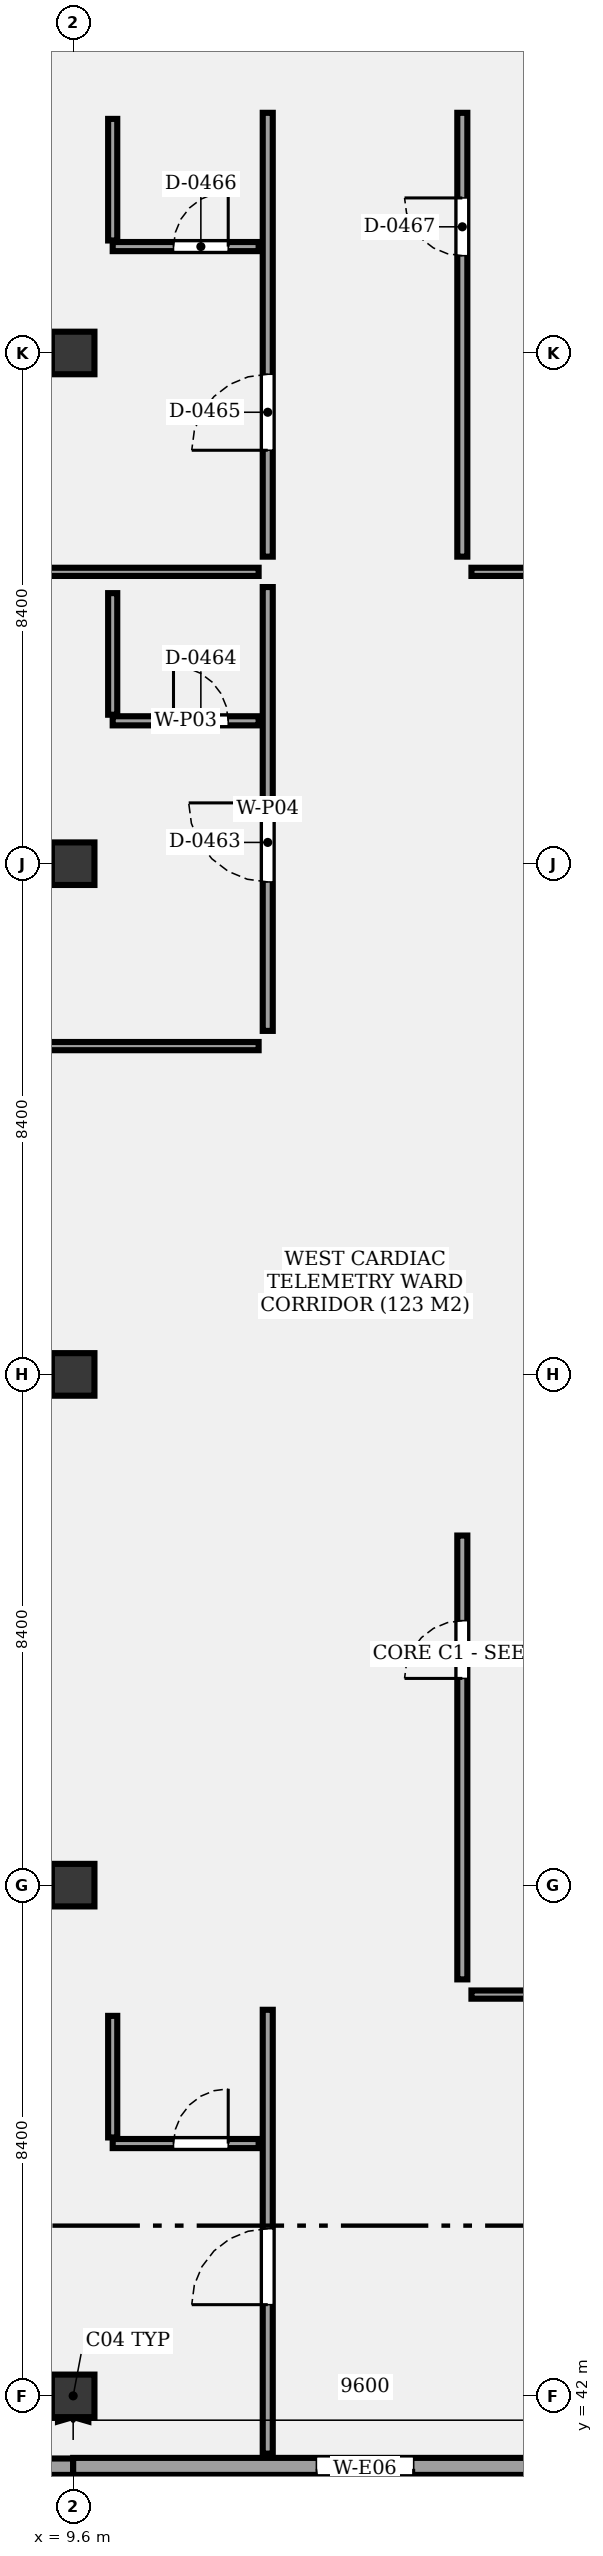
"""IFC4 building model, lengths in metres.
Left out: names, types, materials, properties, quantities, classifications, styles, units other than length and angle.
Written with IfcOpenShell. Run it as: python <this file> out.ifc"""

import sys

from ifc_helpers import new_model, si_unit, direction, frame, frame_2d, origin, origin_2d, place, context, subcontext, project, spatial, rectangle, extrude, element, fill, save


model = new_model("IFC4")
c1 = context("Model", 3, precision=1e-05, world=origin(), true_north=direction((0.0, 1.0)))
c2 = subcontext(c1, "Body", "Model", "MODEL_VIEW")
j1 = project(units=[si_unit("LENGTHUNIT", "METRE"), si_unit("PLANEANGLEUNIT", "RADIAN")], contexts=[c1])
p1 = place(None, origin())
s1 = spatial("IfcSite", under=j1, at=p1, CompositionType="ELEMENT")
p2 = place(p1, origin())
s2 = spatial("IfcBuilding", under=s1, at=p2, CompositionType="ELEMENT")
p3 = place(p2, frame((0.0, 0.0, 22.0)))
s3 = spatial("IfcBuildingStorey", under=s2, at=p3, CompositionType="ELEMENT", Elevation=22.0)
for number, where, z_axis, x_axis in (
    (1, (9.6, 42.0, 0.0), (0.0, 0.0, 1.0), (1.0, 0.0, 0.0)),
    (2, (9.6, 50.4, 0.0), (0.0, 0.0, 1.0), (1.0, 0.0, 0.0)),
    (3, (9.6, 58.8, 0.0), (0.0, 0.0, 1.0), (1.0, 0.0, 0.0)),
    (4, (9.6, 67.2, 0.0), (0.0, 0.0, 1.0), (1.0, 0.0, 0.0)),
    (5, (9.6, 75.6, 0.0), (0.0, 0.0, 1.0), (1.0, 0.0, 0.0)),
):
    element("IfcColumn", number, at=place(p3, frame(where, z_axis=z_axis, x_axis=x_axis)), inside=s3, PredefinedType="COLUMN", context=c2, shape_type="SweptSolid", body=[
        extrude(rectangle(XDim=0.7, YDim=0.7, at=origin_2d()), origin(), (0.0, 0.0, 1.0), 4.2),
    ])
p4 = place(p3, frame((9.6, 40.8, 0.0), z_axis=(0.0, 0.0, 1.0), x_axis=(-1.0, 0.0, 0.0)))
e6 = element("IfcWall", 6, at=p4, inside=s3, PredefinedType="SOLIDWALL", context=c2, shape_type="SweptSolid", body=[
    extrude(rectangle(XDim=9.6, YDim=0.34, at=frame_2d((4.8, 0.0))), origin(), (0.0, 0.0, 1.0), 3.39),
])
p5 = place(p4, frame((2.158, 0.0, 0.85)))
e7 = element("IfcOpeningElement", 7, at=p5, cuts=e6, PredefinedType="OPENING", context=c2, shape_type="SweptSolid", body=[
    extrude(rectangle(XDim=1.3, YDim=1.4, at=frame_2d((0.65, 0.7))), frame((0.0, 0.18, 0.0), z_axis=(0.0, -1.0, 0.0), x_axis=(1.0, 0.0, 0.0)), (0.0, 0.0, 1.0), 0.36),
])
p6 = place(p4, frame((6.142, 0.0, 0.85)))
e8 = element("IfcOpeningElement", 8, at=p6, cuts=e6, PredefinedType="OPENING", context=c2, shape_type="SweptSolid", body=[
    extrude(rectangle(XDim=1.3, YDim=1.4, at=frame_2d((0.65, 0.7))), frame((0.0, 0.18, 0.0), z_axis=(0.0, -1.0, 0.0), x_axis=(1.0, 0.0, 0.0)), (0.0, 0.0, 1.0), 0.36),
])
p7 = place(p3, frame((19.2, 40.8, 0.0), z_axis=(0.0, 0.0, 1.0), x_axis=(-1.0, 0.0, 0.0)))
e9 = element("IfcWall", 9, at=p7, inside=s3, PredefinedType="SOLIDWALL", context=c2, shape_type="SweptSolid", body=[
    extrude(rectangle(XDim=9.6, YDim=0.36, at=frame_2d((4.8, 0.0))), origin(), (0.0, 0.0, 1.0), 3.39),
])
p8 = place(p7, frame((4.0, 0.0, 0.0)))
e10 = element("IfcOpeningElement", 10, at=p8, cuts=e9, PredefinedType="OPENING", context=c2, shape_type="SweptSolid", body=[
    extrude(rectangle(XDim=1.6, YDim=2.3, at=frame_2d((0.8, 1.15))), frame((0.0, 0.19, 0.0), z_axis=(0.0, -1.0, 0.0), x_axis=(1.0, 0.0, 0.0)), (0.0, 0.0, 1.0), 0.38),
])
p9 = place(p3, frame((12.8, 41.05, 0.0), z_axis=(0.0, 0.0, 1.0), x_axis=(0.0, 1.0, 0.0)))
e11 = element("IfcWall", 11, at=p9, inside=s3, PredefinedType="PARTITIONING", context=c2, shape_type="SweptSolid", body=[
    extrude(rectangle(XDim=7.3, YDim=0.165, at=frame_2d((3.65, 0.0))), origin(), (0.0, 0.0, 1.0), 3.3),
])
p10 = place(p9, frame((2.45, 0.0, 0.0)))
e12 = element("IfcOpeningElement", 12, at=p10, cuts=e11, PredefinedType="OPENING", context=c2, shape_type="SweptSolid", body=[
    extrude(rectangle(XDim=1.25, YDim=2.2, at=frame_2d((0.625, 1.1))), frame((0.0, 0.093, 0.0), z_axis=(0.0, -1.0, 0.0), x_axis=(1.0, 0.0, 0.0)), (0.0, 0.0, 1.0), 0.185),
])
p11 = place(p3, frame((10.25, 46.15, 0.0), z_axis=(0.0, 0.0, 1.0), x_axis=(1.0, 0.0, 0.0)))
e13 = element("IfcWall", 13, at=p11, inside=s3, PredefinedType="PARTITIONING", context=c2, shape_type="SweptSolid", body=[
    extrude(rectangle(XDim=2.4, YDim=0.15, at=frame_2d((1.2, 0.0))), origin(), (0.0, 0.0, 1.0), 3.3),
])
p12 = place(p11, frame((1.0, 0.0, 0.0)))
e14 = element("IfcOpeningElement", 14, at=p12, cuts=e13, PredefinedType="OPENING", context=c2, shape_type="SweptSolid", body=[
    extrude(rectangle(XDim=0.9, YDim=2.1, at=frame_2d((0.45, 1.05))), frame((0.0, 0.085, 0.0), z_axis=(0.0, -1.0, 0.0), x_axis=(1.0, 0.0, 0.0)), (0.0, 0.0, 1.0), 0.17),
])
p13 = place(p3, frame((10.25, 46.25, 0.0), z_axis=(0.0, 0.0, 1.0), x_axis=(0.0, 1.0, 0.0)))
e15 = element("IfcWall", 15, at=p13, inside=s3, PredefinedType="PARTITIONING", context=c2, shape_type="SweptSolid", body=[
    extrude(rectangle(XDim=2.0, YDim=0.15, at=frame_2d((1.0, 0.0))), origin(), (0.0, 0.0, 1.0), 3.3),
])
p14 = place(p3, frame((16.0, 48.85, 0.0), z_axis=(0.0, 0.0, 1.0), x_axis=(0.0, 1.0, 0.0)))
e16 = element("IfcWall", 16, at=p14, inside=s3, PredefinedType="PARTITIONING", context=c2, shape_type="SweptSolid", body=[
    extrude(rectangle(XDim=7.3, YDim=0.165, at=frame_2d((3.65, 0.0))), origin(), (0.0, 0.0, 1.0), 3.3),
])
p15 = place(p14, frame((4.95, 0.0, 0.0)))
e17 = element("IfcOpeningElement", 17, at=p15, cuts=e16, PredefinedType="OPENING", context=c2, shape_type="SweptSolid", body=[
    extrude(rectangle(XDim=0.95, YDim=2.1, at=frame_2d((0.475, 1.05))), frame((0.0, 0.093, 0.0), z_axis=(0.0, -1.0, 0.0), x_axis=(1.0, 0.0, 0.0)), (0.0, 0.0, 1.0), 0.185),
])
p16 = place(p3, frame((16.15, 48.6, 0.0), z_axis=(0.0, 0.0, 1.0), x_axis=(1.0, 0.0, 0.0)))
e18 = element("IfcWall", 18, at=p16, inside=s3, PredefinedType="PARTITIONING", context=c2, shape_type="SweptSolid", body=[
    extrude(rectangle(XDim=12.1, YDim=0.135, at=frame_2d((6.05, 0.0))), origin(), (0.0, 0.0, 1.0), 3.3),
])
p17 = place(p3, frame((12.8, 64.45, 0.0), z_axis=(0.0, 0.0, 1.0), x_axis=(0.0, 1.0, 0.0)))
e19 = element("IfcWall", 19, at=p17, inside=s3, PredefinedType="PARTITIONING", context=c2, shape_type="SweptSolid", body=[
    extrude(rectangle(XDim=7.3, YDim=0.165, at=frame_2d((3.65, 0.0))), origin(), (0.0, 0.0, 1.0), 3.3),
])
p18 = place(p17, frame((2.45, 0.0, 0.0)))
e20 = element("IfcOpeningElement", 20, at=p18, cuts=e19, PredefinedType="OPENING", context=c2, shape_type="SweptSolid", body=[
    extrude(rectangle(XDim=1.3, YDim=2.2, at=frame_2d((0.65, 1.1))), frame((0.0, 0.093, 0.0), z_axis=(0.0, -1.0, 0.0), x_axis=(1.0, 0.0, 0.0)), (0.0, 0.0, 1.0), 0.185),
])
p19 = place(p3, frame((10.25, 69.55, 0.0), z_axis=(0.0, 0.0, 1.0), x_axis=(1.0, 0.0, 0.0)))
e21 = element("IfcWall", 21, at=p19, inside=s3, PredefinedType="PARTITIONING", context=c2, shape_type="SweptSolid", body=[
    extrude(rectangle(XDim=2.4, YDim=0.15, at=frame_2d((1.2, 0.0))), origin(), (0.0, 0.0, 1.0), 3.3),
])
p20 = place(p19, frame((1.0, 0.0, 0.0)))
e22 = element("IfcOpeningElement", 22, at=p20, cuts=e21, PredefinedType="OPENING", context=c2, shape_type="SweptSolid", body=[
    extrude(rectangle(XDim=0.9, YDim=2.1, at=frame_2d((0.45, 1.05))), frame((0.0, 0.085, 0.0), z_axis=(0.0, -1.0, 0.0), x_axis=(1.0, 0.0, 0.0)), (0.0, 0.0, 1.0), 0.17),
])
p21 = place(p3, frame((10.25, 69.65, 0.0), z_axis=(0.0, 0.0, 1.0), x_axis=(0.0, 1.0, 0.0)))
e23 = element("IfcWall", 23, at=p21, inside=s3, PredefinedType="PARTITIONING", context=c2, shape_type="SweptSolid", body=[
    extrude(rectangle(XDim=2.0, YDim=0.15, at=frame_2d((1.0, 0.0))), origin(), (0.0, 0.0, 1.0), 3.3),
])
p22 = place(p3, frame((0.55, 64.2, 0.0), z_axis=(0.0, 0.0, 1.0), x_axis=(1.0, 0.0, 0.0)))
e24 = element("IfcWall", 24, at=p22, inside=s3, PredefinedType="PARTITIONING", context=c2, shape_type="SweptSolid", body=[
    extrude(rectangle(XDim=12.1, YDim=0.135, at=frame_2d((6.05, 0.0))), origin(), (0.0, 0.0, 1.0), 3.3),
])
p23 = place(p3, frame((12.8, 72.25, 0.0), z_axis=(0.0, 0.0, 1.0), x_axis=(0.0, 1.0, 0.0)))
e25 = element("IfcWall", 25, at=p23, inside=s3, PredefinedType="PARTITIONING", context=c2, shape_type="SweptSolid", body=[
    extrude(rectangle(XDim=7.3, YDim=0.165, at=frame_2d((3.65, 0.0))), origin(), (0.0, 0.0, 1.0), 3.3),
])
p24 = place(p23, frame((1.75, 0.0, 0.0)))
e26 = element("IfcOpeningElement", 26, at=p24, cuts=e25, PredefinedType="OPENING", context=c2, shape_type="SweptSolid", body=[
    extrude(rectangle(XDim=1.25, YDim=2.2, at=frame_2d((0.625, 1.1))), frame((0.0, 0.093, 0.0), z_axis=(0.0, -1.0, 0.0), x_axis=(1.0, 0.0, 0.0)), (0.0, 0.0, 1.0), 0.185),
])
p25 = place(p3, frame((10.25, 77.35, 0.0), z_axis=(0.0, 0.0, 1.0), x_axis=(1.0, 0.0, 0.0)))
e27 = element("IfcWall", 27, at=p25, inside=s3, PredefinedType="PARTITIONING", context=c2, shape_type="SweptSolid", body=[
    extrude(rectangle(XDim=2.4, YDim=0.15, at=frame_2d((1.2, 0.0))), origin(), (0.0, 0.0, 1.0), 3.3),
])
p26 = place(p25, frame((1.0, 0.0, 0.0)))
e28 = element("IfcOpeningElement", 28, at=p26, cuts=e27, PredefinedType="OPENING", context=c2, shape_type="SweptSolid", body=[
    extrude(rectangle(XDim=0.9, YDim=2.1, at=frame_2d((0.45, 1.05))), frame((0.0, 0.085, 0.0), z_axis=(0.0, -1.0, 0.0), x_axis=(1.0, 0.0, 0.0)), (0.0, 0.0, 1.0), 0.17),
])
p27 = place(p3, frame((10.25, 77.45, 0.0), z_axis=(0.0, 0.0, 1.0), x_axis=(0.0, 1.0, 0.0)))
e29 = element("IfcWall", 29, at=p27, inside=s3, PredefinedType="PARTITIONING", context=c2, shape_type="SweptSolid", body=[
    extrude(rectangle(XDim=2.0, YDim=0.15, at=frame_2d((1.0, 0.0))), origin(), (0.0, 0.0, 1.0), 3.3),
])
p28 = place(p3, frame((0.55, 72.0, 0.0), z_axis=(0.0, 0.0, 1.0), x_axis=(1.0, 0.0, 0.0)))
e30 = element("IfcWall", 30, at=p28, inside=s3, PredefinedType="PARTITIONING", context=c2, shape_type="SweptSolid", body=[
    extrude(rectangle(XDim=12.1, YDim=0.135, at=frame_2d((6.05, 0.0))), origin(), (0.0, 0.0, 1.0), 3.3),
])
p29 = place(p3, frame((16.0, 72.25, 0.0), z_axis=(0.0, 0.0, 1.0), x_axis=(0.0, 1.0, 0.0)))
e31 = element("IfcWall", 31, at=p29, inside=s3, PredefinedType="PARTITIONING", context=c2, shape_type="SweptSolid", body=[
    extrude(rectangle(XDim=7.3, YDim=0.165, at=frame_2d((3.65, 0.0))), origin(), (0.0, 0.0, 1.0), 3.3),
])
p30 = place(p29, frame((4.95, 0.0, 0.0)))
e32 = element("IfcOpeningElement", 32, at=p30, cuts=e31, PredefinedType="OPENING", context=c2, shape_type="SweptSolid", body=[
    extrude(rectangle(XDim=0.95, YDim=2.1, at=frame_2d((0.475, 1.05))), frame((0.0, 0.093, 0.0), z_axis=(0.0, -1.0, 0.0), x_axis=(1.0, 0.0, 0.0)), (0.0, 0.0, 1.0), 0.185),
])
p31 = place(p3, frame((16.15, 72.0, 0.0), z_axis=(0.0, 0.0, 1.0), x_axis=(1.0, 0.0, 0.0)))
e33 = element("IfcWall", 33, at=p31, inside=s3, PredefinedType="PARTITIONING", context=c2, shape_type="SweptSolid", body=[
    extrude(rectangle(XDim=12.1, YDim=0.135, at=frame_2d((6.05, 0.0))), origin(), (0.0, 0.0, 1.0), 3.3),
])
p32 = place(p8, origin())
e34 = element("IfcDoor", 34, at=p32, inside=s3, OperationType="SINGLE_SWING_LEFT", PredefinedType="DOOR", context=c2, shape_type="SweptSolid", body=[
    extrude(rectangle(XDim=1.6, YDim=2.3, at=frame_2d((0.8, 1.15))), frame((0.0, 0.025, 0.0), z_axis=(0.0, -1.0, 0.0), x_axis=(1.0, 0.0, 0.0)), (0.0, 0.0, 1.0), 0.05),
])
fill(e10, e34)
p33 = place(p10, origin())
e35 = element("IfcDoor", 35, at=p33, inside=s3, OperationType="SINGLE_SWING_LEFT", PredefinedType="DOOR", context=c2, shape_type="SweptSolid", body=[
    extrude(rectangle(XDim=1.25, YDim=2.2, at=frame_2d((0.625, 1.1))), frame((0.0, 0.025, 0.0), z_axis=(0.0, -1.0, 0.0), x_axis=(1.0, 0.0, 0.0)), (0.0, 0.0, 1.0), 0.05),
])
fill(e12, e35)
p34 = place(p12, origin())
e36 = element("IfcDoor", 36, at=p34, inside=s3, OperationType="SINGLE_SWING_RIGHT", PredefinedType="DOOR", context=c2, shape_type="SweptSolid", body=[
    extrude(rectangle(XDim=0.9, YDim=2.1, at=frame_2d((0.45, 1.05))), frame((0.0, 0.025, 0.0), z_axis=(0.0, -1.0, 0.0), x_axis=(1.0, 0.0, 0.0)), (0.0, 0.0, 1.0), 0.05),
])
fill(e14, e36)
p35 = place(p15, origin())
e37 = element("IfcDoor", 37, at=p35, inside=s3, OperationType="SINGLE_SWING_LEFT", PredefinedType="DOOR", context=c2, shape_type="SweptSolid", body=[
    extrude(rectangle(XDim=0.95, YDim=2.1, at=frame_2d((0.475, 1.05))), frame((0.0, 0.025, 0.0), z_axis=(0.0, -1.0, 0.0), x_axis=(1.0, 0.0, 0.0)), (0.0, 0.0, 1.0), 0.05),
])
fill(e17, e37)
p36 = place(p18, origin())
e38 = element("IfcDoor", 38, at=p36, inside=s3, OperationType="SINGLE_SWING_RIGHT", PredefinedType="DOOR", context=c2, shape_type="SweptSolid", body=[
    extrude(rectangle(XDim=1.3, YDim=2.2, at=frame_2d((0.65, 1.1))), frame((0.0, 0.025, 0.0), z_axis=(0.0, -1.0, 0.0), x_axis=(1.0, 0.0, 0.0)), (0.0, 0.0, 1.0), 0.05),
])
fill(e20, e38)
p37 = place(p20, origin())
e39 = element("IfcDoor", 39, at=p37, inside=s3, OperationType="SINGLE_SWING_LEFT", PredefinedType="DOOR", context=c2, shape_type="SweptSolid", body=[
    extrude(rectangle(XDim=0.9, YDim=2.1, at=frame_2d((0.45, 1.05))), frame((0.0, 0.025, 0.0), z_axis=(0.0, -1.0, 0.0), x_axis=(1.0, 0.0, 0.0)), (0.0, 0.0, 1.0), 0.05),
])
fill(e22, e39)
p38 = place(p24, origin())
e40 = element("IfcDoor", 40, at=p38, inside=s3, OperationType="SINGLE_SWING_LEFT", PredefinedType="DOOR", context=c2, shape_type="SweptSolid", body=[
    extrude(rectangle(XDim=1.25, YDim=2.2, at=frame_2d((0.625, 1.1))), frame((0.0, 0.025, 0.0), z_axis=(0.0, -1.0, 0.0), x_axis=(1.0, 0.0, 0.0)), (0.0, 0.0, 1.0), 0.05),
])
fill(e26, e40)
p39 = place(p26, origin())
e41 = element("IfcDoor", 41, at=p39, inside=s3, OperationType="SINGLE_SWING_RIGHT", PredefinedType="DOOR", context=c2, shape_type="SweptSolid", body=[
    extrude(rectangle(XDim=0.9, YDim=2.1, at=frame_2d((0.45, 1.05))), frame((0.0, 0.025, 0.0), z_axis=(0.0, -1.0, 0.0), x_axis=(1.0, 0.0, 0.0)), (0.0, 0.0, 1.0), 0.05),
])
fill(e28, e41)
p40 = place(p30, origin())
e42 = element("IfcDoor", 42, at=p40, inside=s3, OperationType="SINGLE_SWING_RIGHT", PredefinedType="DOOR", context=c2, shape_type="SweptSolid", body=[
    extrude(rectangle(XDim=0.95, YDim=2.1, at=frame_2d((0.475, 1.05))), frame((0.0, 0.025, 0.0), z_axis=(0.0, -1.0, 0.0), x_axis=(1.0, 0.0, 0.0)), (0.0, 0.0, 1.0), 0.05),
])
fill(e32, e42)
save(model, sys.argv[1])
